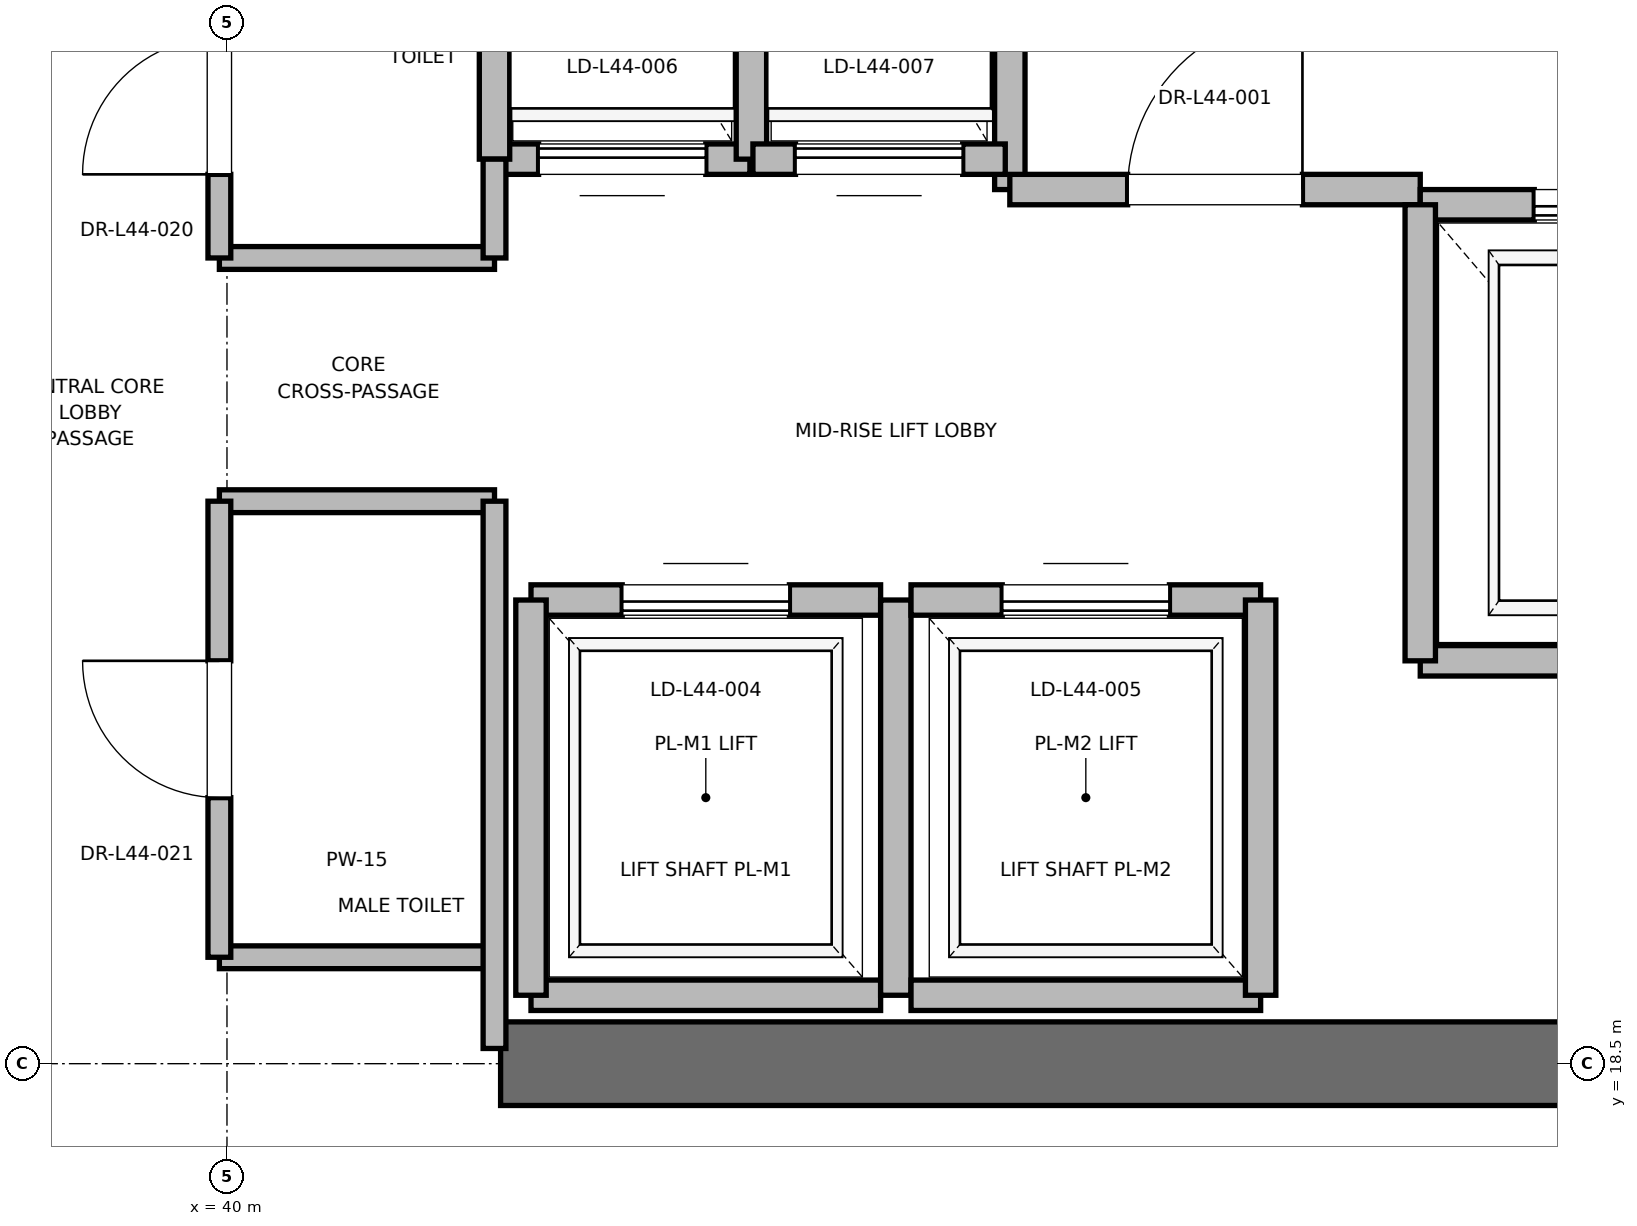
"""IFC4 building model, lengths in metres.
Left out: names, types, materials, properties, quantities, classifications, styles, units other than length and angle.
Written with IfcOpenShell. Run it as: python <this file> out.ifc"""

import sys

from ifc_helpers import new_model, si_unit, direction, frame, frame_2d, origin, place, context, subcontext, project, spatial, rectangle, extrude, element, fill, save


model = new_model("IFC4")
c1 = context("Model", 3, precision=1e-05, world=origin(), true_north=direction((0.0, 1.0)))
c2 = subcontext(c1, "Body", "Model", "MODEL_VIEW")
j1 = project(units=[si_unit("LENGTHUNIT", "METRE"), si_unit("PLANEANGLEUNIT", "RADIAN")], contexts=[c1])
p1 = place(None, origin())
s1 = spatial("IfcSite", under=j1, at=p1, CompositionType="ELEMENT")
p2 = place(p1, origin())
s2 = spatial("IfcBuilding", under=s1, at=p2, CompositionType="ELEMENT")
p3 = place(p2, frame((0.0, 0.0, 189.4)))
s3 = spatial("IfcBuildingStorey", under=s2, at=p3, CompositionType="ELEMENT", Elevation=189.4)
p4 = place(p3, frame((41.8, 18.5, 0.0), z_axis=(0.0, 0.0, 1.0), x_axis=(1.0, 0.0, 0.0)))
e1 = element("IfcWall", 1, at=p4, inside=s3, PredefinedType="SHEAR", context=c2, shape_type="SweptSolid", body=[
    extrude(rectangle(XDim=9.2, YDim=0.55, at=frame_2d((4.6, 0.0))), origin(), (0.0, 0.0, 1.0), 5.1),
])
p5 = place(p3, frame((45.15, 24.25, 0.0), z_axis=(0.0, 0.0, 1.0), x_axis=(0.0, 1.0, 0.0)))
e2 = element("IfcWall", 2, at=p5, inside=s3, PredefinedType="PARTITIONING", context=c2, shape_type="SweptSolid", body=[
    extrude(rectangle(XDim=3.37, YDim=0.2, at=frame_2d((1.685, 0.0))), origin(), (0.0, 0.0, 1.0), 5.1),
])
p6 = place(p3, frame((45.15, 24.25, 0.0), z_axis=(0.0, 0.0, 1.0), x_axis=(1.0, 0.0, 0.0)))
e3 = element("IfcWall", 3, at=p6, inside=s3, PredefinedType="PARTITIONING", context=c2, shape_type="SweptSolid", body=[
    extrude(rectangle(XDim=2.7, YDim=0.2, at=frame_2d((1.35, 0.0))), origin(), (0.0, 0.0, 1.0), 5.1),
])
p7 = place(p6, frame((0.775, 0.0, 0.0)))
e4 = element("IfcOpeningElement", 4, at=p7, cuts=e3, PredefinedType="OPENING", context=c2, shape_type="SweptSolid", body=[
    extrude(rectangle(XDim=1.15, YDim=2.2, at=frame_2d((0.575, 1.1))), frame((0.0, 0.1, 0.0), z_axis=(0.0, -1.0, 0.0), x_axis=(1.0, 0.0, 0.0)), (0.0, 0.0, 1.0), 0.2),
])
p8 = place(p3, frame((47.85, 21.15, 0.0), z_axis=(0.0, 0.0, 1.0), x_axis=(1.0, 0.0, 0.0)))
e5 = element("IfcWall", 5, at=p8, inside=s3, PredefinedType="SOLIDWALL", context=c2, shape_type="SweptSolid", body=[
    extrude(rectangle(XDim=2.6, YDim=0.2, at=frame_2d((1.3, 0.0))), origin(), (0.0, 0.0, 1.0), 5.1),
])
p9 = place(p3, frame((50.45, 24.15, 0.0), z_axis=(0.0, 0.0, 1.0), x_axis=(-1.0, 0.0, 0.0)))
e6 = element("IfcWall", 6, at=p9, inside=s3, PredefinedType="SOLIDWALL", context=c2, shape_type="SweptSolid", body=[
    extrude(rectangle(XDim=2.6, YDim=0.2, at=frame_2d((1.3, 0.0))), origin(), (0.0, 0.0, 1.0), 4.08),
])
p10 = place(p9, frame((0.75, 0.0, 0.0)))
e7 = element("IfcOpeningElement", 7, at=p10, cuts=e6, PredefinedType="OPENING", context=c2, shape_type="SweptSolid", body=[
    extrude(rectangle(XDim=1.1, YDim=2.2, at=frame_2d((0.55, 1.1))), frame((0.0, 0.1, 0.0), z_axis=(0.0, -1.0, 0.0), x_axis=(1.0, 0.0, 0.0)), (0.0, 0.0, 1.0), 0.2),
])
p11 = place(p3, frame((47.85, 24.15, 0.0), z_axis=(0.0, 0.0, 1.0), x_axis=(0.0, -1.0, 0.0)))
e8 = element("IfcWall", 8, at=p11, inside=s3, PredefinedType="SOLIDWALL", context=c2, shape_type="SweptSolid", body=[
    extrude(rectangle(XDim=3.0, YDim=0.2, at=frame_2d((1.5, 0.0))), origin(), (0.0, 0.0, 1.0), 5.1),
])
p12 = place(p3, frame((42.0, 18.95, 0.0), z_axis=(0.0, 0.0, 1.0), x_axis=(1.0, 0.0, 0.0)))
e9 = element("IfcWall", 9, at=p12, inside=s3, PredefinedType="SOLIDWALL", context=c2, shape_type="SweptSolid", body=[
    extrude(rectangle(XDim=2.3, YDim=0.2, at=frame_2d((1.15, 0.0))), origin(), (0.0, 0.0, 1.0), 4.08),
])
p13 = place(p3, frame((44.3, 21.55, 0.0), z_axis=(0.0, 0.0, 1.0), x_axis=(-1.0, 0.0, 0.0)))
e10 = element("IfcWall", 10, at=p13, inside=s3, PredefinedType="SOLIDWALL", context=c2, shape_type="SweptSolid", body=[
    extrude(rectangle(XDim=2.3, YDim=0.2, at=frame_2d((1.15, 0.0))), origin(), (0.0, 0.0, 1.0), 5.1),
])
p14 = place(p13, frame((0.6, 0.0, 0.0)))
e11 = element("IfcOpeningElement", 11, at=p14, cuts=e10, PredefinedType="OPENING", context=c2, shape_type="SweptSolid", body=[
    extrude(rectangle(XDim=1.1, YDim=2.2, at=frame_2d((0.55, 1.1))), frame((0.0, 0.1, 0.0), z_axis=(0.0, -1.0, 0.0), x_axis=(1.0, 0.0, 0.0)), (0.0, 0.0, 1.0), 0.2),
])
p15 = place(p3, frame((42.0, 21.55, 0.0), z_axis=(0.0, 0.0, 1.0), x_axis=(0.0, -1.0, 0.0)))
e12 = element("IfcWall", 12, at=p15, inside=s3, PredefinedType="SOLIDWALL", context=c2, shape_type="SweptSolid", body=[
    extrude(rectangle(XDim=2.6, YDim=0.2, at=frame_2d((1.3, 0.0))), origin(), (0.0, 0.0, 1.0), 4.08),
])
p16 = place(p3, frame((44.4, 18.95, 0.0), z_axis=(0.0, 0.0, 1.0), x_axis=(0.0, 1.0, 0.0)))
e13 = element("IfcWall", 13, at=p16, inside=s3, PredefinedType="SOLIDWALL", context=c2, shape_type="SweptSolid", body=[
    extrude(rectangle(XDim=2.6, YDim=0.2, at=frame_2d((1.3, 0.0))), origin(), (0.0, 0.0, 1.0), 5.1),
])
p17 = place(p3, frame((44.5, 18.95, 0.0), z_axis=(0.0, 0.0, 1.0), x_axis=(1.0, 0.0, 0.0)))
e14 = element("IfcWall", 14, at=p17, inside=s3, PredefinedType="SOLIDWALL", context=c2, shape_type="SweptSolid", body=[
    extrude(rectangle(XDim=2.3, YDim=0.2, at=frame_2d((1.15, 0.0))), origin(), (0.0, 0.0, 1.0), 5.1),
])
p18 = place(p3, frame((46.8, 21.55, 0.0), z_axis=(0.0, 0.0, 1.0), x_axis=(-1.0, 0.0, 0.0)))
e15 = element("IfcWall", 15, at=p18, inside=s3, PredefinedType="SOLIDWALL", context=c2, shape_type="SweptSolid", body=[
    extrude(rectangle(XDim=2.3, YDim=0.2, at=frame_2d((1.15, 0.0))), origin(), (0.0, 0.0, 1.0), 5.1),
])
p19 = place(p18, frame((0.6, 0.0, 0.0)))
e16 = element("IfcOpeningElement", 16, at=p19, cuts=e15, PredefinedType="OPENING", context=c2, shape_type="SweptSolid", body=[
    extrude(rectangle(XDim=1.1, YDim=2.2, at=frame_2d((0.55, 1.1))), frame((0.0, 0.1, 0.0), z_axis=(0.0, -1.0, 0.0), x_axis=(1.0, 0.0, 0.0)), (0.0, 0.0, 1.0), 0.2),
])
p20 = place(p3, frame((46.8, 18.95, 0.0), z_axis=(0.0, 0.0, 1.0), x_axis=(0.0, 1.0, 0.0)))
e17 = element("IfcWall", 17, at=p20, inside=s3, PredefinedType="SOLIDWALL", context=c2, shape_type="SweptSolid", body=[
    extrude(rectangle(XDim=2.6, YDim=0.2, at=frame_2d((1.3, 0.0))), origin(), (0.0, 0.0, 1.0), 5.1),
])
p21 = place(p3, frame((41.76, 24.45, 0.0), z_axis=(0.0, 0.0, 1.0), x_axis=(1.0, 0.0, 0.0)))
e18 = element("IfcWall", 18, at=p21, inside=s3, PredefinedType="SOLIDWALL", context=c2, shape_type="SweptSolid", body=[
    extrude(rectangle(XDim=1.68, YDim=0.2, at=frame_2d((0.84, 0.0))), origin(), (0.0, 0.0, 1.0), 5.1),
])
p22 = place(p21, frame((0.29, 0.0, 0.0)))
e19 = element("IfcOpeningElement", 19, at=p22, cuts=e18, PredefinedType="OPENING", context=c2, shape_type="SweptSolid", body=[
    extrude(rectangle(XDim=1.1, YDim=2.2, at=frame_2d((0.55, 1.1))), frame((0.0, 0.1, 0.0), z_axis=(0.0, -1.0, 0.0), x_axis=(1.0, 0.0, 0.0)), (0.0, 0.0, 1.0), 0.2),
])
for number, where, z_axis, x_axis in (
    (20, (41.76, 27.05, 0.0), (0.0, 0.0, 1.0), (0.0, -1.0, 0.0)),
    (21, (43.45, 24.45, 0.0), (0.0, 0.0, 1.0), (0.0, 1.0, 0.0)),
):
    element("IfcWall", number, at=place(p3, frame(where, z_axis=z_axis, x_axis=x_axis)), inside=s3, PredefinedType="SOLIDWALL", context=c2, shape_type="SweptSolid", body=[
        extrude(rectangle(XDim=2.6, YDim=0.2, at=frame_2d((1.3, 0.0))), origin(), (0.0, 0.0, 1.0), 5.1),
    ])
p23 = place(p3, frame((43.46, 24.45, 0.0), z_axis=(0.0, 0.0, 1.0), x_axis=(1.0, 0.0, 0.0)))
e22 = element("IfcWall", 22, at=p23, inside=s3, PredefinedType="SOLIDWALL", context=c2, shape_type="SweptSolid", body=[
    extrude(rectangle(XDim=1.66, YDim=0.2, at=frame_2d((0.83, 0.0))), origin(), (0.0, 0.0, 1.0), 5.1),
])
p24 = place(p23, frame((0.28, 0.0, 0.0)))
e23 = element("IfcOpeningElement", 23, at=p24, cuts=e22, PredefinedType="OPENING", context=c2, shape_type="SweptSolid", body=[
    extrude(rectangle(XDim=1.1, YDim=2.2, at=frame_2d((0.55, 1.1))), frame((0.0, 0.1, 0.0), z_axis=(0.0, -1.0, 0.0), x_axis=(1.0, 0.0, 0.0)), (0.0, 0.0, 1.0), 0.2),
])
for number, where, z_axis, x_axis in (
    (24, (39.95, 19.2, 0.0), (0.0, 0.0, 1.0), (1.0, 0.0, 0.0)),
    (25, (39.95, 22.2, 0.0), (0.0, 0.0, 1.0), (1.0, 0.0, 0.0)),
    (26, (39.95, 23.8, 0.0), (0.0, 0.0, 1.0), (1.0, 0.0, 0.0)),
):
    element("IfcWall", number, at=place(p3, frame(where, z_axis=z_axis, x_axis=x_axis)), inside=s3, PredefinedType="PARTITIONING", context=c2, shape_type="SweptSolid", body=[
        extrude(rectangle(XDim=1.81, YDim=0.15, at=frame_2d((0.905, 0.0))), origin(), (0.0, 0.0, 1.0), 2.85),
    ])
p25 = place(p3, frame((41.76, 18.6, 0.0), z_axis=(0.0, 0.0, 1.0), x_axis=(0.0, 1.0, 0.0)))
e27 = element("IfcWall", 27, at=p25, inside=s3, PredefinedType="PARTITIONING", context=c2, shape_type="SweptSolid", body=[
    extrude(rectangle(XDim=3.6, YDim=0.15, at=frame_2d((1.8, 0.0))), origin(), (0.0, 0.0, 1.0), 2.85),
])
p26 = place(p3, frame((41.76, 23.8, 0.0), z_axis=(0.0, 0.0, 1.0), x_axis=(0.0, 1.0, 0.0)))
e28 = element("IfcWall", 28, at=p26, inside=s3, PredefinedType="PARTITIONING", context=c2, shape_type="SweptSolid", body=[
    extrude(rectangle(XDim=0.65, YDim=0.15, at=frame_2d((0.325, 0.0))), origin(), (0.0, 0.0, 1.0), 2.85),
])
p27 = place(p3, frame((39.95, 19.2, 0.0), z_axis=(0.0, 0.0, 1.0), x_axis=(0.0, 1.0, 0.0)))
e29 = element("IfcWall", 29, at=p27, inside=s3, PredefinedType="PARTITIONING", context=c2, shape_type="SweptSolid", body=[
    extrude(rectangle(XDim=3.0, YDim=0.15, at=frame_2d((1.5, 0.0))), origin(), (0.0, 0.0, 1.0), 2.85),
])
p28 = place(p27, frame((1.05, 0.0, 0.0)))
e30 = element("IfcOpeningElement", 30, at=p28, cuts=e29, PredefinedType="OPENING", context=c2, shape_type="SweptSolid", body=[
    extrude(rectangle(XDim=0.9, YDim=2.1, at=frame_2d((0.45, 1.05))), frame((0.0, 0.075, 0.0), z_axis=(0.0, -1.0, 0.0), x_axis=(1.0, 0.0, 0.0)), (0.0, 0.0, 1.0), 0.15),
])
p29 = place(p3, frame((39.95, 23.8, 0.0), z_axis=(0.0, 0.0, 1.0), x_axis=(0.0, 1.0, 0.0)))
e31 = element("IfcWall", 31, at=p29, inside=s3, PredefinedType="PARTITIONING", context=c2, shape_type="SweptSolid", body=[
    extrude(rectangle(XDim=2.0, YDim=0.15, at=frame_2d((1.0, 0.0))), origin(), (0.0, 0.0, 1.0), 2.85),
])
p30 = place(p29, frame((0.55, 0.0, 0.0)))
e32 = element("IfcOpeningElement", 32, at=p30, cuts=e31, PredefinedType="OPENING", context=c2, shape_type="SweptSolid", body=[
    extrude(rectangle(XDim=0.9, YDim=2.1, at=frame_2d((0.45, 1.05))), frame((0.0, 0.075, 0.0), z_axis=(0.0, -1.0, 0.0), x_axis=(1.0, 0.0, 0.0)), (0.0, 0.0, 1.0), 0.15),
])
p31 = place(p7, origin())
e33 = element("IfcDoor", 33, at=p31, inside=s3, OperationType="SINGLE_SWING_RIGHT", PredefinedType="DOOR", context=c2, shape_type="SweptSolid", body=[
    extrude(rectangle(XDim=1.15, YDim=2.2, at=frame_2d((0.575, 1.1))), frame((0.0, 0.025, 0.0), z_axis=(0.0, -1.0, 0.0), x_axis=(1.0, 0.0, 0.0)), (0.0, 0.0, 1.0), 0.05),
])
fill(e4, e33)
p32 = place(p10, origin())
e34 = element("IfcDoor", 34, at=p32, inside=s3, OperationType="SLIDING_TO_RIGHT", PredefinedType="DOOR", context=c2, shape_type="SweptSolid", body=[
    extrude(rectangle(XDim=1.1, YDim=2.2, at=frame_2d((0.55, 1.1))), frame((0.0, 0.025, 0.0), z_axis=(0.0, -1.0, 0.0), x_axis=(1.0, 0.0, 0.0)), (0.0, 0.0, 1.0), 0.05),
])
fill(e7, e34)
p33 = place(p14, origin())
e35 = element("IfcDoor", 35, at=p33, inside=s3, OperationType="SLIDING_TO_RIGHT", PredefinedType="DOOR", context=c2, shape_type="SweptSolid", body=[
    extrude(rectangle(XDim=1.1, YDim=2.2, at=frame_2d((0.55, 1.1))), frame((0.0, 0.025, 0.0), z_axis=(0.0, -1.0, 0.0), x_axis=(1.0, 0.0, 0.0)), (0.0, 0.0, 1.0), 0.05),
])
fill(e11, e35)
p34 = place(p19, origin())
e36 = element("IfcDoor", 36, at=p34, inside=s3, OperationType="SLIDING_TO_RIGHT", PredefinedType="DOOR", context=c2, shape_type="SweptSolid", body=[
    extrude(rectangle(XDim=1.1, YDim=2.2, at=frame_2d((0.55, 1.1))), frame((0.0, 0.025, 0.0), z_axis=(0.0, -1.0, 0.0), x_axis=(1.0, 0.0, 0.0)), (0.0, 0.0, 1.0), 0.05),
])
fill(e16, e36)
p35 = place(p22, origin())
e37 = element("IfcDoor", 37, at=p35, inside=s3, OperationType="SLIDING_TO_RIGHT", PredefinedType="DOOR", context=c2, shape_type="SweptSolid", body=[
    extrude(rectangle(XDim=1.1, YDim=2.2, at=frame_2d((0.55, 1.1))), frame((0.0, 0.025, 0.0), z_axis=(0.0, -1.0, 0.0), x_axis=(1.0, 0.0, 0.0)), (0.0, 0.0, 1.0), 0.05),
])
fill(e19, e37)
p36 = place(p24, origin())
e38 = element("IfcDoor", 38, at=p36, inside=s3, OperationType="SLIDING_TO_RIGHT", PredefinedType="DOOR", context=c2, shape_type="SweptSolid", body=[
    extrude(rectangle(XDim=1.1, YDim=2.2, at=frame_2d((0.55, 1.1))), frame((0.0, 0.025, 0.0), z_axis=(0.0, -1.0, 0.0), x_axis=(1.0, 0.0, 0.0)), (0.0, 0.0, 1.0), 0.05),
])
fill(e23, e38)
p37 = place(p28, origin())
e39 = element("IfcDoor", 39, at=p37, inside=s3, OperationType="SINGLE_SWING_RIGHT", PredefinedType="DOOR", context=c2, shape_type="SweptSolid", body=[
    extrude(rectangle(XDim=0.9, YDim=2.1, at=frame_2d((0.45, 1.05))), frame((0.0, 0.025, 0.0), z_axis=(0.0, -1.0, 0.0), x_axis=(1.0, 0.0, 0.0)), (0.0, 0.0, 1.0), 0.05),
])
fill(e30, e39)
p38 = place(p30, origin())
e40 = element("IfcDoor", 40, at=p38, inside=s3, OperationType="SINGLE_SWING_LEFT", PredefinedType="DOOR", context=c2, shape_type="SweptSolid", body=[
    extrude(rectangle(XDim=0.9, YDim=2.1, at=frame_2d((0.45, 1.05))), frame((0.0, 0.025, 0.0), z_axis=(0.0, -1.0, 0.0), x_axis=(1.0, 0.0, 0.0)), (0.0, 0.0, 1.0), 0.05),
])
fill(e32, e40)
save(model, sys.argv[1])
